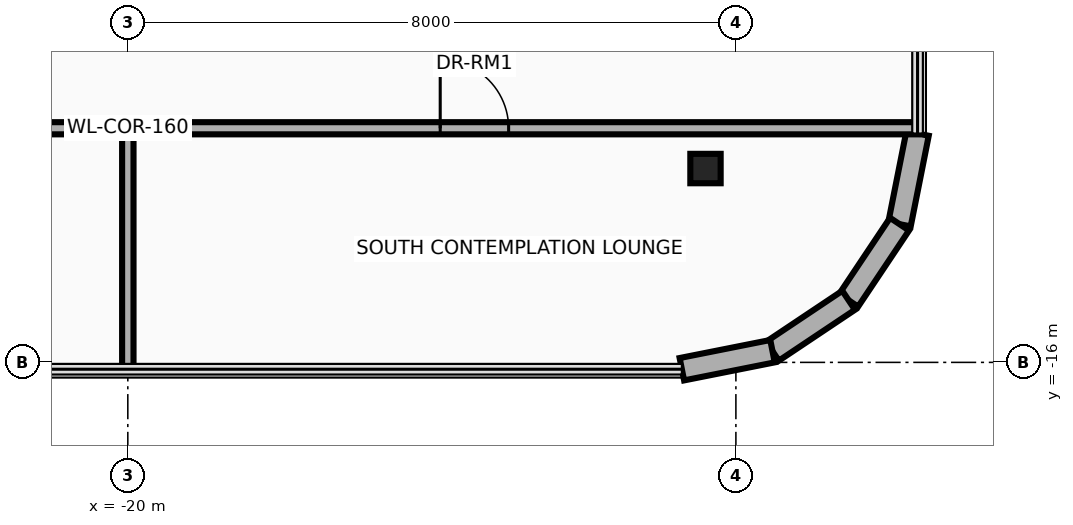
"""IFC4 building model, lengths in metres.
Left out: names, types, materials, properties, quantities, classifications, styles, units other than length and angle.
Written with IfcOpenShell. Run it as: python <this file> out.ifc"""

import sys

from ifc_helpers import new_model, si_unit, direction, frame, frame_2d, origin, origin_2d, place, context, subcontext, project, spatial, rectangle, i_section, extrude, source, transform, mapped, element, fill, save


model = new_model("IFC4")
c1 = context("Model", 3, precision=1e-05, world=origin(), true_north=direction((0.0, 1.0)))
c2 = subcontext(c1, "Body", "Model", "MODEL_VIEW")
j1 = project(units=[si_unit("LENGTHUNIT", "METRE"), si_unit("PLANEANGLEUNIT", "RADIAN")], contexts=[c1])
p1 = place(None, origin())
s1 = spatial("IfcSite", under=j1, at=p1, CompositionType="ELEMENT")
p2 = place(p1, origin())
s2 = spatial("IfcBuilding", under=s1, at=p2, CompositionType="ELEMENT")
p3 = place(p2, frame((0.0, 0.0, 287.0)))
s3 = spatial("IfcBuildingStorey", under=s2, at=p3, CompositionType="ELEMENT", Elevation=287.0)
m1 = source(origin(), c2, "Body", "SweptSolid", [
    extrude(i_section(OverallWidth=0.399, OverallDepth=0.387, WebThickness=0.021, FlangeThickness=0.033, at=origin_2d()), origin(), (0.0, 0.0, 1.0), 3.6),
])
p4 = place(p3, frame((-12.4, -13.45, 0.0), z_axis=(0.0, 0.0, 1.0), x_axis=(1.0, 0.0, 0.0)))
e1 = element("IfcColumn", 1, at=p4, inside=s3, PredefinedType="PILASTER", context=c2, shape_type="MappedRepresentation", body=[
    mapped(m1, transform((0.0, 0.0, 0.0), x_axis=(1.0, 0.0, 0.0), y_axis=(0.0, 1.0, 0.0), z_axis=(0.0, 0.0, 1.0), scale=1.0)),
])
p5 = place(p3, frame((-9.61, -12.989, 0.0), z_axis=(0.0, 0.0, 1.0), x_axis=(-0.194996050505, -0.980804027463, 0.0)))
e2 = element("IfcWall", 2, at=p5, inside=s3, PredefinedType="SOLIDWALL", context=c2, shape_type="SweptSolid", body=[
    extrude(rectangle(XDim=1.216, YDim=0.3, at=frame_2d((0.608, 0.0))), origin(), (0.0, 0.0, 1.0), 3.36),
])
for number, where, z_axis, x_axis in (
    (3, (-9.847, -14.182, 0.0), (0.0, 0.0, 1.0), (-0.556, -0.831, 0.0)),
    (4, (-10.517, -15.183, 0.0), (0.0, 0.0, 1.0), (-0.831, -0.556, 0.0)),
):
    element("IfcWall", number, at=place(p3, frame(where, z_axis=z_axis, x_axis=x_axis)), inside=s3, PredefinedType="SOLIDWALL", context=c2, shape_type="SweptSolid", body=[
        extrude(rectangle(XDim=1.205, YDim=0.3, at=frame_2d((0.603, 0.0))), origin(), (0.0, 0.0, 1.0), 3.36),
    ])
p6 = place(p3, frame((-11.518, -15.853, 0.0), z_axis=(0.0, 0.0, 1.0), x_axis=(-0.980765602568, -0.195189223115, 0.0)))
e5 = element("IfcWall", 5, at=p6, inside=s3, PredefinedType="SOLIDWALL", context=c2, shape_type="SweptSolid", body=[
    extrude(rectangle(XDim=1.216, YDim=0.3, at=frame_2d((0.608, 0.0))), origin(), (0.0, 0.0, 1.0), 3.36),
])
p7 = place(p3, frame((-30.39, -12.92, 0.0), z_axis=(0.0, 0.0, 1.0), x_axis=(1.0, 0.0, 0.0)))
e6 = element("IfcWall", 6, at=p7, inside=s3, PredefinedType="PARTITIONING", context=c2, shape_type="SweptSolid", body=[
    extrude(rectangle(XDim=20.78, YDim=0.16, at=frame_2d((10.39, 0.0))), origin(), (0.0, 0.0, 1.0), 2.734),
])
p8 = place(p7, frame((4.4, 0.0, 0.0)))
e7 = element("IfcOpeningElement", 7, at=p8, cuts=e6, PredefinedType="OPENING", context=c2, shape_type="SweptSolid", body=[
    extrude(rectangle(XDim=0.9, YDim=2.1, at=frame_2d((0.45, 1.05))), frame((0.0, 0.095, 0.0), z_axis=(0.0, -1.0, 0.0), x_axis=(1.0, 0.0, 0.0)), (0.0, 0.0, 1.0), 0.19),
])
p9 = place(p7, frame((14.5, 0.0, 0.0)))
e8 = element("IfcOpeningElement", 8, at=p9, cuts=e6, PredefinedType="OPENING", context=c2, shape_type="SweptSolid", body=[
    extrude(rectangle(XDim=0.9, YDim=2.1, at=frame_2d((0.45, 1.05))), frame((0.0, 0.095, 0.0), z_axis=(0.0, -1.0, 0.0), x_axis=(1.0, 0.0, 0.0)), (0.0, 0.0, 1.0), 0.19),
])
p10 = place(p3, frame((-20.0, -16.09, 0.0), z_axis=(0.0, 0.0, 1.0), x_axis=(0.0, 1.0, 0.0)))
e9 = element("IfcWall", 9, at=p10, inside=s3, PredefinedType="PARTITIONING", context=c2, shape_type="SweptSolid", body=[
    extrude(rectangle(XDim=3.17, YDim=0.15, at=frame_2d((1.585, 0.0))), origin(), (0.0, 0.0, 1.0), 2.806),
])
p11 = place(p9, origin())
e10 = element("IfcDoor", 10, at=p11, inside=s3, OperationType="SINGLE_SWING_RIGHT", PredefinedType="DOOR", context=c2, shape_type="SweptSolid", body=[
    extrude(rectangle(XDim=0.9, YDim=2.1, at=frame_2d((0.45, 1.05))), frame((0.0, 0.025, 0.0), z_axis=(0.0, -1.0, 0.0), x_axis=(1.0, 0.0, 0.0)), (0.0, 0.0, 1.0), 0.05),
])
fill(e8, e10)
save(model, sys.argv[1])
